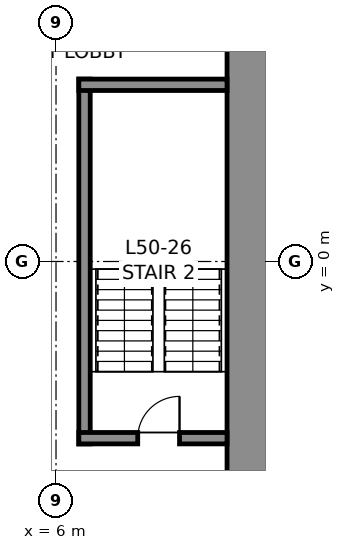
"""IFC4 building model, lengths in metres.
Left out: names, types, materials, properties, quantities, classifications, styles, units other than length and angle.
Written with IfcOpenShell. Run it as: python <this file> out.ifc"""

import sys

from ifc_helpers import new_model, si_unit, direction, frame, frame_2d, origin, place, context, subcontext, project, spatial, rectangle, extrude, element, fill, save


model = new_model("IFC4")
c1 = context("Model", 3, precision=1e-05, world=origin(), true_north=direction((0.0, 1.0)))
c2 = subcontext(c1, "Body", "Model", "MODEL_VIEW")
j1 = project(units=[si_unit("LENGTHUNIT", "METRE"), si_unit("PLANEANGLEUNIT", "RADIAN")], contexts=[c1])
p1 = place(None, origin())
s1 = spatial("IfcSite", under=j1, at=p1, CompositionType="ELEMENT")
p2 = place(p1, origin())
s2 = spatial("IfcBuilding", under=s1, at=p2, CompositionType="ELEMENT")
p3 = place(p2, frame((0.0, 0.0, 229.8)))
s3 = spatial("IfcBuildingStorey", under=s2, at=p3, CompositionType="ELEMENT", Elevation=229.8)
p4 = place(p3, frame((11.25, 10.5, 0.0), z_axis=(0.0, 0.0, 1.0), x_axis=(0.0, -1.0, 0.0)))
e1 = element("IfcWall", 1, at=p4, inside=s3, PredefinedType="SHEAR", context=c2, shape_type="SweptSolid", body=[
    extrude(rectangle(XDim=21.0, YDim=1.5, at=frame_2d((10.5, 0.0))), origin(), (0.0, 0.0, 1.0), 4.0),
])
p5 = place(p4, frame((3.7, 0.0, 0.0)))
e2 = element("IfcOpeningElement", 2, at=p5, cuts=e1, PredefinedType="OPENING", context=c2, shape_type="SweptSolid", body=[
    extrude(rectangle(XDim=1.2, YDim=2.3, at=frame_2d((0.6, 1.15))), frame((0.0, 0.76, 0.0), z_axis=(0.0, -1.0, 0.0), x_axis=(1.0, 0.0, 0.0)), (0.0, 0.0, 1.0), 1.52),
])
p6 = place(p4, frame((16.1, 0.0, 0.0)))
e3 = element("IfcOpeningElement", 3, at=p6, cuts=e1, PredefinedType="OPENING", context=c2, shape_type="SweptSolid", body=[
    extrude(rectangle(XDim=1.2, YDim=2.3, at=frame_2d((0.6, 1.15))), frame((0.0, 0.76, 0.0), z_axis=(0.0, -1.0, 0.0), x_axis=(1.0, 0.0, 0.0)), (0.0, 0.0, 1.0), 1.52),
])
p7 = place(p3, frame((6.75, -4.8, 0.0), z_axis=(0.0, 0.0, 1.0), x_axis=(0.0, 1.0, 0.0)))
e4 = element("IfcWall", 4, at=p7, inside=s3, PredefinedType="SOLIDWALL", context=c2, shape_type="SweptSolid", body=[
    extrude(rectangle(XDim=9.6, YDim=0.3, at=frame_2d((4.8, 0.0))), origin(), (0.0, 0.0, 1.0), 3.75),
])
p8 = place(p3, frame((6.6, 4.65, 0.0), z_axis=(0.0, 0.0, 1.0), x_axis=(1.0, 0.0, 0.0)))
e5 = element("IfcWall", 5, at=p8, inside=s3, PredefinedType="SOLIDWALL", context=c2, shape_type="SweptSolid", body=[
    extrude(rectangle(XDim=3.9, YDim=0.3, at=frame_2d((1.95, 0.0))), origin(), (0.0, 0.0, 1.0), 3.75),
])
p9 = place(p3, frame((10.5, -4.65, 0.0), z_axis=(0.0, 0.0, 1.0), x_axis=(-1.0, 0.0, 0.0)))
e6 = element("IfcWall", 6, at=p9, inside=s3, PredefinedType="SOLIDWALL", context=c2, shape_type="SweptSolid", body=[
    extrude(rectangle(XDim=3.9, YDim=0.3, at=frame_2d((1.95, 0.0))), origin(), (0.0, 0.0, 1.0), 3.75),
])
p10 = place(p9, frame((1.25, 0.0, 0.0)))
e7 = element("IfcOpeningElement", 7, at=p10, cuts=e6, PredefinedType="OPENING", context=c2, shape_type="SweptSolid", body=[
    extrude(rectangle(XDim=1.1, YDim=2.3, at=frame_2d((0.55, 1.15))), frame((0.0, 0.16, 0.0), z_axis=(0.0, -1.0, 0.0), x_axis=(1.0, 0.0, 0.0)), (0.0, 0.0, 1.0), 0.32),
])
p11 = place(p10, frame((1.1, 0.0, 0.0), z_axis=(0.0, 0.0, 1.0), x_axis=(-1.0, 0.0, 0.0)))
e8 = element("IfcDoor", 8, at=p11, inside=s3, OperationType="SINGLE_SWING_RIGHT", PredefinedType="DOOR", context=c2, shape_type="SweptSolid", body=[
    extrude(rectangle(XDim=1.1, YDim=2.3, at=frame_2d((0.55, 1.15))), frame((0.0, 0.025, 0.0), z_axis=(0.0, -1.0, 0.0), x_axis=(1.0, 0.0, 0.0)), (0.0, 0.0, 1.0), 0.05),
])
fill(e7, e8)
save(model, sys.argv[1])
